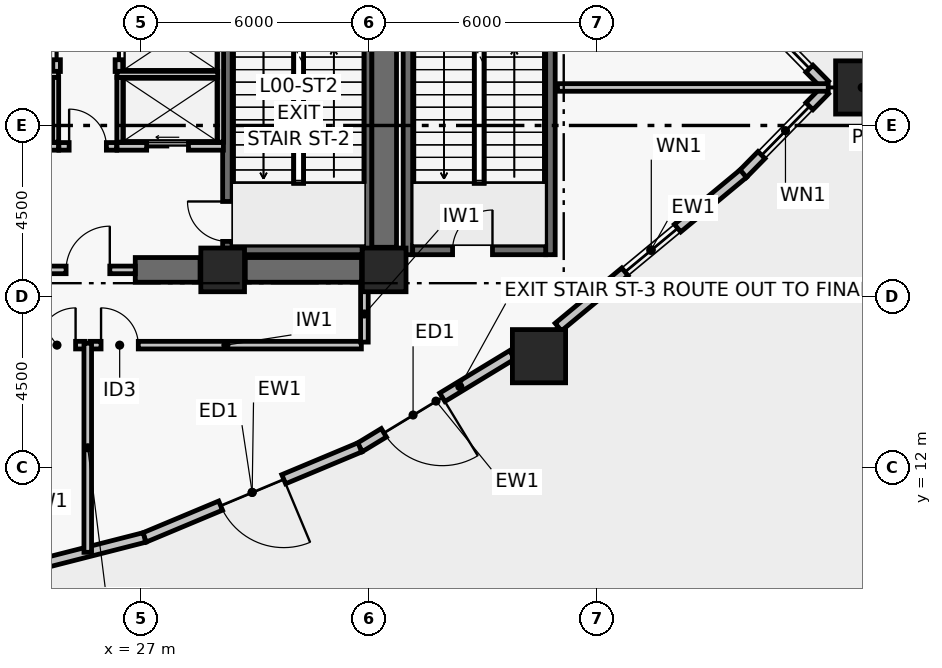
"""IFC4 building model, lengths in metres.
Left out: names, types, materials, properties, quantities, classifications, styles, units other than length and angle.
Written with IfcOpenShell. Run it as: python <this file> out.ifc"""

import sys

from ifc_helpers import new_model, si_unit, direction, frame, frame_2d, origin, origin_2d, place, context, subcontext, project, spatial, rectangle, hollow_rectangle, extrude, element, fill, save


model = new_model("IFC4")
c1 = context("Model", 3, precision=1e-05, world=origin(), true_north=direction((0.0, 1.0)))
c2 = subcontext(c1, "Body", "Model", "MODEL_VIEW")
j1 = project(units=[si_unit("LENGTHUNIT", "METRE"), si_unit("PLANEANGLEUNIT", "RADIAN")], contexts=[c1])
p1 = place(None, origin())
s1 = spatial("IfcSite", under=j1, at=p1, CompositionType="ELEMENT")
p2 = place(p1, origin())
s2 = spatial("IfcBuilding", under=s1, at=p2, CompositionType="ELEMENT")
p3 = place(p2, origin())
s3 = spatial("IfcBuildingStorey", under=s2, at=p3, CompositionType="ELEMENT", Elevation=0.0)
for number, where, z_axis, x_axis in (
    (1, (29.15, 17.2, 0.0), (0.0, 0.0, 1.0), (1.0, 0.0, 0.0)),
    (2, (33.4, 17.2, 0.0), (0.0, 0.0, 1.0), (1.0, 0.0, 0.0)),
):
    element("IfcColumn", number, at=place(p3, frame(where, z_axis=z_axis, x_axis=x_axis)), inside=s3, PredefinedType="COLUMN", context=c2, shape_type="SweptSolid", body=[
        extrude(rectangle(XDim=1.15, YDim=1.15, at=origin_2d()), origin(), (0.0, 0.0, 1.0), 7.2),
    ])
p4 = place(p3, frame((26.85, 17.2, 0.0), z_axis=(0.0, 0.0, 1.0), x_axis=(1.0, 0.0, 0.0)))
e3 = element("IfcWall", 3, at=p4, inside=s3, PredefinedType="SHEAR", context=c2, shape_type="SweptSolid", body=[
    extrude(rectangle(XDim=1.705, YDim=0.65, at=frame_2d((0.853, 0.0))), origin(), (0.0, 0.0, 1.0), 6.88),
])
p5 = place(p3, frame((29.745, 17.2, 0.0), z_axis=(0.0, 0.0, 1.0), x_axis=(1.0, 0.0, 0.0)))
e4 = element("IfcWall", 4, at=p5, inside=s3, PredefinedType="SHEAR", context=c2, shape_type="SweptSolid", body=[
    extrude(rectangle(XDim=3.06, YDim=0.65, at=frame_2d((1.53, 0.0))), origin(), (0.0, 0.0, 1.0), 6.88),
])
p6 = place(p3, frame((33.4, 17.795, 0.0), z_axis=(0.0, 0.0, 1.0), x_axis=(0.0, 1.0, 0.0)))
e5 = element("IfcWall", 5, at=p6, inside=s3, PredefinedType="SHEAR", context=c2, shape_type="SweptSolid", body=[
    extrude(rectangle(XDim=8.41, YDim=0.65, at=frame_2d((4.205, 0.0))), origin(), (0.0, 0.0, 1.0), 6.88),
])
p7 = place(p3, frame((29.275, 17.6, 0.0), z_axis=(0.0, 0.0, 1.0), x_axis=(0.0, 1.0, 0.0)))
e6 = element("IfcWall", 6, at=p7, inside=s3, PredefinedType="SHEAR", context=c2, shape_type="SweptSolid", body=[
    extrude(rectangle(XDim=8.8, YDim=0.25, at=frame_2d((4.4, 0.0))), origin(), (0.0, 0.0, 1.0), 6.88),
])
p8 = place(p7, frame((0.35, 0.0, 0.0)))
e7 = element("IfcOpeningElement", 7, at=p8, cuts=e6, PredefinedType="OPENING", context=c2, shape_type="SweptSolid", body=[
    extrude(rectangle(XDim=1.05, YDim=2.08, at=frame_2d((0.525, 1.04))), frame((0.0, 0.135, 0.0), z_axis=(0.0, -1.0, 0.0), x_axis=(1.0, 0.0, 0.0)), (0.0, 0.0, 1.0), 0.27),
])
p9 = place(p3, frame((32.946, 17.6, 0.0), z_axis=(0.0, 0.0, 1.0), x_axis=(0.0, 1.0, 0.0)))
e8 = element("IfcWall", 8, at=p9, inside=s3, PredefinedType="SHEAR", context=c2, shape_type="SweptSolid", body=[
    extrude(rectangle(XDim=8.8, YDim=0.25, at=frame_2d((4.4, 0.0))), origin(), (0.0, 0.0, 1.0), 6.88),
])
p10 = place(p3, frame((29.4, 17.725, 0.0), z_axis=(0.0, 0.0, 1.0), x_axis=(1.0, 0.0, 0.0)))
e9 = element("IfcWall", 9, at=p10, inside=s3, PredefinedType="SHEAR", context=c2, shape_type="SweptSolid", body=[
    extrude(rectangle(XDim=3.421, YDim=0.25, at=frame_2d((1.71, 0.0))), origin(), (0.0, 0.0, 1.0), 6.88),
])
for number, where, z_axis, x_axis in (
    (10, (34.025, 17.6, 0.0), (0.0, 0.0, 1.0), (0.0, 1.0, 0.0)),
    (11, (37.775, 17.6, 0.0), (0.0, 0.0, 1.0), (0.0, 1.0, 0.0)),
):
    element("IfcWall", number, at=place(p3, frame(where, z_axis=z_axis, x_axis=x_axis)), inside=s3, PredefinedType="SHEAR", context=c2, shape_type="SweptSolid", body=[
        extrude(rectangle(XDim=8.8, YDim=0.25, at=frame_2d((4.4, 0.0))), origin(), (0.0, 0.0, 1.0), 6.88),
    ])
p11 = place(p3, frame((34.15, 17.725, 0.0), z_axis=(0.0, 0.0, 1.0), x_axis=(1.0, 0.0, 0.0)))
e12 = element("IfcWall", 12, at=p11, inside=s3, PredefinedType="SHEAR", context=c2, shape_type="SweptSolid", body=[
    extrude(rectangle(XDim=3.5, YDim=0.25, at=frame_2d((1.75, 0.0))), origin(), (0.0, 0.0, 1.0), 6.88),
])
p12 = place(p11, frame((1.05, 0.0, 0.0)))
e13 = element("IfcOpeningElement", 13, at=p12, cuts=e12, PredefinedType="OPENING", context=c2, shape_type="SweptSolid", body=[
    extrude(rectangle(XDim=1.05, YDim=2.08, at=frame_2d((0.525, 1.04))), frame((0.0, 0.135, 0.0), z_axis=(0.0, -1.0, 0.0), x_axis=(1.0, 0.0, 0.0)), (0.0, 0.0, 1.0), 0.27),
])
for number, where, z_axis, x_axis in (
    (14, (45.979, 22.0, 0.0), (0.0, 0.0, 1.0), (1.0, 0.0, 0.0)),
    (15, (37.474, 14.929, 0.0), (0.0, 0.0, 1.0), (1.0, 0.0, 0.0)),
):
    element("IfcColumn", number, at=place(p3, frame(where, z_axis=z_axis, x_axis=x_axis)), inside=s3, PredefinedType="USERDEFINED", context=c2, shape_type="SweptSolid", body=[
        extrude(hollow_rectangle(XDim=1.4, YDim=1.4, WallThickness=0.055, at=origin_2d()), origin(), (0.0, 0.0, 1.0), 7.2),
    ])
p13 = place(p3, frame((36.767, 14.965, 0.0), z_axis=(0.0, 0.0, 1.0), x_axis=(-0.854658781081, -0.519190107688, 0.0)))
e16 = element("IfcWall", 16, at=p13, inside=s3, PredefinedType="PARTITIONING", context=c2, shape_type="SweptSolid", body=[
    extrude(rectangle(XDim=4.688, YDim=0.26, at=frame_2d((2.344, 0.0))), origin(), (0.0, 0.0, 1.0), 5.43),
])
p14 = place(p13, frame((2.15, 0.0, 0.0)))
e17 = element("IfcOpeningElement", 17, at=p14, cuts=e16, PredefinedType="OPENING", context=c2, shape_type="SweptSolid", body=[
    extrude(rectangle(XDim=1.8, YDim=2.3, at=frame_2d((0.9, 1.15))), frame((0.0, 0.14, 0.0), z_axis=(0.0, -1.0, 0.0), x_axis=(1.0, 0.0, 0.0)), (0.0, 0.0, 1.0), 0.28),
])
p15 = place(p3, frame((32.76, 12.531, 0.0), z_axis=(0.0, 0.0, 1.0), x_axis=(-0.922544641811, -0.385890378042, 0.0)))
e18 = element("IfcWall", 18, at=p15, inside=s3, PredefinedType="PARTITIONING", context=c2, shape_type="SweptSolid", body=[
    extrude(rectangle(XDim=6.144, YDim=0.26, at=frame_2d((3.072, 0.0))), origin(), (0.0, 0.0, 1.0), 5.43),
])
p16 = place(p15, frame((2.172, 0.0, 0.0)))
e19 = element("IfcOpeningElement", 19, at=p16, cuts=e18, PredefinedType="OPENING", context=c2, shape_type="SweptSolid", body=[
    extrude(rectangle(XDim=1.8, YDim=2.3, at=frame_2d((0.9, 1.15))), frame((0.0, 0.14, 0.0), z_axis=(0.0, -1.0, 0.0), x_axis=(1.0, 0.0, 0.0)), (0.0, 0.0, 1.0), 0.28),
])
p17 = place(p3, frame((27.092, 10.16, 0.0), z_axis=(0.0, 0.0, 1.0), x_axis=(-0.968977702302, -0.247148158887, 0.0)))
e20 = element("IfcWall", 20, at=p17, inside=s3, PredefinedType="PARTITIONING", context=c2, shape_type="SweptSolid", body=[
    extrude(rectangle(XDim=6.286, YDim=0.26, at=frame_2d((3.143, 0.0))), origin(), (0.0, 0.0, 1.0), 5.43),
])
p18 = place(p3, frame((42.841, 24.275, 0.0), z_axis=(0.0, 0.0, 1.0), x_axis=(0.700581279712, -0.713572610543, 0.0)))
e21 = element("IfcWall", 21, at=p18, inside=s3, PredefinedType="PARTITIONING", context=c2, shape_type="SweptSolid", body=[
    extrude(rectangle(XDim=3.082, YDim=0.26, at=frame_2d((1.541, 0.0))), origin(), (0.0, 0.0, 1.0), 5.43),
])
p19 = place(p18, frame((0.698, 0.0, 0.9)))
e22 = element("IfcOpeningElement", 22, at=p19, cuts=e21, PredefinedType="OPENING", context=c2, shape_type="SweptSolid", body=[
    extrude(rectangle(XDim=1.8, YDim=1.5, at=frame_2d((0.9, 0.75))), frame((0.0, 0.14, 0.0), z_axis=(0.0, -1.0, 0.0), x_axis=(1.0, 0.0, 0.0)), (0.0, 0.0, 1.0), 0.28),
])
p20 = place(p3, frame((45.0, 21.924, 0.0), z_axis=(0.0, 0.0, 1.0), x_axis=(-0.700581279712, -0.713572610543, 0.0)))
e23 = element("IfcWall", 23, at=p20, inside=s3, PredefinedType="PARTITIONING", context=c2, shape_type="SweptSolid", body=[
    extrude(rectangle(XDim=3.082, YDim=0.26, at=frame_2d((1.541, 0.0))), origin(), (0.0, 0.0, 1.0), 5.43),
])
p21 = place(p20, frame((0.585, 0.0, 0.9)))
e24 = element("IfcOpeningElement", 24, at=p21, cuts=e23, PredefinedType="OPENING", context=c2, shape_type="SweptSolid", body=[
    extrude(rectangle(XDim=1.8, YDim=1.5, at=frame_2d((0.9, 0.75))), frame((0.0, 0.14, 0.0), z_axis=(0.0, -1.0, 0.0), x_axis=(1.0, 0.0, 0.0)), (0.0, 0.0, 1.0), 0.28),
])
p22 = place(p3, frame((42.85, 19.733, 0.0), z_axis=(0.0, 0.0, 1.0), x_axis=(-0.769753796379, -0.638340890873, 0.0)))
e25 = element("IfcWall", 25, at=p22, inside=s3, PredefinedType="PARTITIONING", context=c2, shape_type="SweptSolid", body=[
    extrude(rectangle(XDim=6.324, YDim=0.26, at=frame_2d((3.162, 0.0))), origin(), (0.0, 0.0, 1.0), 5.43),
])
p23 = place(p22, frame((2.246, 0.0, 0.9)))
e26 = element("IfcOpeningElement", 26, at=p23, cuts=e25, PredefinedType="OPENING", context=c2, shape_type="SweptSolid", body=[
    extrude(rectangle(XDim=1.8, YDim=1.5, at=frame_2d((0.9, 0.75))), frame((0.0, 0.14, 0.0), z_axis=(0.0, -1.0, 0.0), x_axis=(1.0, 0.0, 0.0)), (0.0, 0.0, 1.0), 0.28),
])
p24 = place(p3, frame((24.35, 17.2, 0.0), z_axis=(0.0, 0.0, 1.0), x_axis=(1.0, 0.0, 0.0)))
e27 = element("IfcWall", 27, at=p24, inside=s3, PredefinedType="PARTITIONING", context=c2, shape_type="SweptSolid", body=[
    extrude(rectangle(XDim=2.5, YDim=0.2, at=frame_2d((1.25, 0.0))), origin(), (0.0, 0.0, 1.0), 6.01),
])
p25 = place(p24, frame((0.68, 0.0, 0.0)))
e28 = element("IfcOpeningElement", 28, at=p25, cuts=e27, PredefinedType="OPENING", context=c2, shape_type="SweptSolid", body=[
    extrude(rectangle(XDim=1.15, YDim=2.08, at=frame_2d((0.575, 1.04))), frame((0.0, 0.11, 0.0), z_axis=(0.0, -1.0, 0.0), x_axis=(1.0, 0.0, 0.0)), (0.0, 0.0, 1.0), 0.22),
])
p26 = place(p3, frame((24.84, 20.45, 0.0), z_axis=(0.0, 0.0, 1.0), x_axis=(1.0, 0.0, 0.0)))
e29 = element("IfcWall", 29, at=p26, inside=s3, PredefinedType="PARTITIONING", context=c2, shape_type="SweptSolid", body=[
    extrude(rectangle(XDim=1.52, YDim=0.2, at=frame_2d((0.76, 0.0))), origin(), (0.0, 0.0, 1.0), 6.88),
])
p27 = place(p26, frame((0.27, 0.0, 0.0)))
e30 = element("IfcOpeningElement", 30, at=p27, cuts=e29, PredefinedType="OPENING", context=c2, shape_type="SweptSolid", body=[
    extrude(rectangle(XDim=0.98, YDim=2.06, at=frame_2d((0.49, 1.03))), frame((0.0, 0.11, 0.0), z_axis=(0.0, -1.0, 0.0), x_axis=(1.0, 0.0, 0.0)), (0.0, 0.0, 1.0), 0.22),
])
p28 = place(p3, frame((22.03, 20.45, 0.0), z_axis=(0.0, 0.0, 1.0), x_axis=(1.0, 0.0, 0.0)))
e31 = element("IfcWall", 31, at=p28, inside=s3, PredefinedType="PARTITIONING", context=c2, shape_type="SweptSolid", body=[
    extrude(rectangle(XDim=2.8, YDim=0.2, at=frame_2d((1.4, 0.0))), origin(), (0.0, 0.0, 1.0), 6.88),
])
p29 = place(p28, frame((0.78, 0.0, 0.0)))
e32 = element("IfcOpeningElement", 32, at=p29, cuts=e31, PredefinedType="OPENING", context=c2, shape_type="SweptSolid", body=[
    extrude(rectangle(XDim=1.1, YDim=2.08, at=frame_2d((0.55, 1.04))), frame((0.0, 0.11, 0.0), z_axis=(0.0, -1.0, 0.0), x_axis=(1.0, 0.0, 0.0)), (0.0, 0.0, 1.0), 0.22),
])
p30 = place(p3, frame((26.37, 20.45, 0.0), z_axis=(0.0, 0.0, 1.0), x_axis=(1.0, 0.0, 0.0)))
e33 = element("IfcWall", 33, at=p30, inside=s3, PredefinedType="PARTITIONING", context=c2, shape_type="SweptSolid", body=[
    extrude(rectangle(XDim=2.8, YDim=0.2, at=frame_2d((1.4, 0.0))), origin(), (0.0, 0.0, 1.0), 6.88),
])
p31 = place(p30, frame((0.78, 0.0, 0.0)))
e34 = element("IfcOpeningElement", 34, at=p31, cuts=e33, PredefinedType="OPENING", context=c2, shape_type="SweptSolid", body=[
    extrude(rectangle(XDim=1.1, YDim=2.08, at=frame_2d((0.55, 1.04))), frame((0.0, 0.11, 0.0), z_axis=(0.0, -1.0, 0.0), x_axis=(1.0, 0.0, 0.0)), (0.0, 0.0, 1.0), 0.22),
])
p32 = place(p3, frame((24.78, 22.42, 0.0), z_axis=(0.0, 0.0, 1.0), x_axis=(0.0, 1.0, 0.0)))
e35 = element("IfcWall", 35, at=p32, inside=s3, PredefinedType="PARTITIONING", context=c2, shape_type="SweptSolid", body=[
    extrude(rectangle(XDim=1.72, YDim=0.2, at=frame_2d((0.86, 0.0))), origin(), (0.0, 0.0, 1.0), 6.88),
])
p33 = place(p32, frame((0.31, 0.0, 0.0)))
e36 = element("IfcOpeningElement", 36, at=p33, cuts=e35, PredefinedType="OPENING", context=c2, shape_type="SweptSolid", body=[
    extrude(rectangle(XDim=1.1, YDim=2.08, at=frame_2d((0.55, 1.04))), frame((0.0, 0.11, 0.0), z_axis=(0.0, -1.0, 0.0), x_axis=(1.0, 0.0, 0.0)), (0.0, 0.0, 1.0), 0.22),
])
p34 = place(p3, frame((26.42, 22.42, 0.0), z_axis=(0.0, 0.0, 1.0), x_axis=(0.0, 1.0, 0.0)))
e37 = element("IfcWall", 37, at=p34, inside=s3, PredefinedType="PARTITIONING", context=c2, shape_type="SweptSolid", body=[
    extrude(rectangle(XDim=1.72, YDim=0.2, at=frame_2d((0.86, 0.0))), origin(), (0.0, 0.0, 1.0), 6.88),
])
p35 = place(p34, frame((0.31, 0.0, 0.0)))
e38 = element("IfcOpeningElement", 38, at=p35, cuts=e37, PredefinedType="OPENING", context=c2, shape_type="SweptSolid", body=[
    extrude(rectangle(XDim=1.1, YDim=2.08, at=frame_2d((0.55, 1.04))), frame((0.0, 0.11, 0.0), z_axis=(0.0, -1.0, 0.0), x_axis=(1.0, 0.0, 0.0)), (0.0, 0.0, 1.0), 0.22),
])
p36 = place(p3, frame((24.755, 20.56, 0.0), z_axis=(0.0, 0.0, 1.0), x_axis=(0.0, 1.0, 0.0)))
e39 = element("IfcWall", 39, at=p36, inside=s3, PredefinedType="PARTITIONING", context=c2, shape_type="SweptSolid", body=[
    extrude(rectangle(XDim=1.71, YDim=0.16, at=frame_2d((0.855, 0.0))), origin(), (0.0, 0.0, 1.0), 6.88),
])
p37 = place(p3, frame((22.18, 22.345, 0.0), z_axis=(0.0, 0.0, 1.0), x_axis=(1.0, 0.0, 0.0)))
e40 = element("IfcWall", 40, at=p37, inside=s3, PredefinedType="PARTITIONING", context=c2, shape_type="SweptSolid", body=[
    extrude(rectangle(XDim=2.65, YDim=0.16, at=frame_2d((1.325, 0.0))), origin(), (0.0, 0.0, 1.0), 6.88),
])
p38 = place(p3, frame((29.095, 20.56, 0.0), z_axis=(0.0, 0.0, 1.0), x_axis=(0.0, 1.0, 0.0)))
e41 = element("IfcWall", 41, at=p38, inside=s3, PredefinedType="PARTITIONING", context=c2, shape_type="SweptSolid", body=[
    extrude(rectangle(XDim=5.45, YDim=0.16, at=frame_2d((2.725, 0.0))), origin(), (0.0, 0.0, 1.0), 6.88),
])
p39 = place(p3, frame((26.445, 20.56, 0.0), z_axis=(0.0, 0.0, 1.0), x_axis=(0.0, 1.0, 0.0)))
e42 = element("IfcWall", 42, at=p39, inside=s3, PredefinedType="PARTITIONING", context=c2, shape_type="SweptSolid", body=[
    extrude(rectangle(XDim=1.71, YDim=0.16, at=frame_2d((0.855, 0.0))), origin(), (0.0, 0.0, 1.0), 6.88),
])
p40 = place(p3, frame((26.37, 22.345, 0.0), z_axis=(0.0, 0.0, 1.0), x_axis=(1.0, 0.0, 0.0)))
e43 = element("IfcWall", 43, at=p40, inside=s3, PredefinedType="PARTITIONING", context=c2, shape_type="SweptSolid", body=[
    extrude(rectangle(XDim=2.65, YDim=0.16, at=frame_2d((1.325, 0.0))), origin(), (0.0, 0.0, 1.0), 6.88),
])
p41 = place(p3, frame((17.552, 15.22, 0.0), z_axis=(0.0, 0.0, 1.0), x_axis=(1.0, 0.0, 0.0)))
e44 = element("IfcWall", 44, at=p41, inside=s3, PredefinedType="PARTITIONING", context=c2, shape_type="SweptSolid", body=[
    extrude(rectangle(XDim=7.978, YDim=0.2, at=frame_2d((3.989, 0.0))), origin(), (0.0, 0.0, 1.0), 5.46),
])
p42 = place(p41, frame((6.748, 0.0, 0.0)))
e45 = element("IfcOpeningElement", 45, at=p42, cuts=e44, PredefinedType="OPENING", context=c2, shape_type="SweptSolid", body=[
    extrude(rectangle(XDim=0.98, YDim=2.06, at=frame_2d((0.49, 1.03))), frame((0.0, 0.11, 0.0), z_axis=(0.0, -1.0, 0.0), x_axis=(1.0, 0.0, 0.0)), (0.0, 0.0, 1.0), 0.22),
])
p43 = place(p3, frame((25.67, 15.22, 0.0), z_axis=(0.0, 0.0, 1.0), x_axis=(1.0, 0.0, 0.0)))
e46 = element("IfcWall", 46, at=p43, inside=s3, PredefinedType="PARTITIONING", context=c2, shape_type="SweptSolid", body=[
    extrude(rectangle(XDim=7.13, YDim=0.2, at=frame_2d((3.565, 0.0))), origin(), (0.0, 0.0, 1.0), 6.88),
])
p44 = place(p43, frame((0.28, 0.0, 0.0)))
e47 = element("IfcOpeningElement", 47, at=p44, cuts=e46, PredefinedType="OPENING", context=c2, shape_type="SweptSolid", body=[
    extrude(rectangle(XDim=0.98, YDim=2.06, at=frame_2d((0.49, 1.03))), frame((0.0, 0.11, 0.0), z_axis=(0.0, -1.0, 0.0), x_axis=(1.0, 0.0, 0.0)), (0.0, 0.0, 1.0), 0.22),
])
p45 = place(p3, frame((32.88, 15.3, 0.0), z_axis=(0.0, 0.0, 1.0), x_axis=(0.0, 1.0, 0.0)))
e48 = element("IfcWall", 48, at=p45, inside=s3, PredefinedType="PARTITIONING", context=c2, shape_type="SweptSolid", body=[
    extrude(rectangle(XDim=1.48, YDim=0.2, at=frame_2d((0.74, 0.0))), origin(), (0.0, 0.0, 1.0), 6.01),
])
p46 = place(p3, frame((32.88, 16.78, 0.0), z_axis=(0.0, 0.0, 1.0), x_axis=(1.0, 0.0, 0.0)))
e49 = element("IfcWall", 49, at=p46, inside=s3, PredefinedType="PARTITIONING", context=c2, shape_type="SweptSolid", body=[
    extrude(rectangle(XDim=0.86, YDim=0.2, at=frame_2d((0.43, 0.0))), origin(), (0.0, 0.0, 1.0), 5.46),
])
p47 = place(p3, frame((25.6, 9.769, 0.0), z_axis=(0.0, 0.0, 1.0), x_axis=(0.0, 1.0, 0.0)))
e50 = element("IfcWall", 50, at=p47, inside=s3, PredefinedType="PARTITIONING", context=c2, shape_type="SweptSolid", body=[
    extrude(rectangle(XDim=5.501, YDim=0.2, at=frame_2d((2.75, 0.0))), origin(), (0.0, 0.0, 1.0), 6.88),
])
p48 = place(p3, frame((37.96, 22.0, 0.0), z_axis=(0.0, 0.0, 1.0), x_axis=(1.0, 0.0, 0.0)))
e51 = element("IfcWall", 51, at=p48, inside=s3, PredefinedType="PARTITIONING", context=c2, shape_type="SweptSolid", body=[
    extrude(rectangle(XDim=7.125, YDim=0.2, at=frame_2d((3.562, 0.0))), origin(), (0.0, 0.0, 1.0), 6.88),
])
p49 = place(p14, origin())
e52 = element("IfcDoor", 52, at=p49, inside=s3, OperationType="DOUBLE_DOOR_SINGLE_SWING", PredefinedType="DOOR", context=c2, shape_type="SweptSolid", body=[
    extrude(rectangle(XDim=1.8, YDim=2.3, at=frame_2d((0.9, 1.15))), frame((0.0, 0.025, 0.0), z_axis=(0.0, -1.0, 0.0), x_axis=(1.0, 0.0, 0.0)), (0.0, 0.0, 1.0), 0.05),
])
fill(e17, e52)
p50 = place(p16, origin())
e53 = element("IfcDoor", 53, at=p50, inside=s3, OperationType="DOUBLE_DOOR_SINGLE_SWING", PredefinedType="DOOR", context=c2, shape_type="SweptSolid", body=[
    extrude(rectangle(XDim=1.8, YDim=2.3, at=frame_2d((0.9, 1.15))), frame((0.0, 0.025, 0.0), z_axis=(0.0, -1.0, 0.0), x_axis=(1.0, 0.0, 0.0)), (0.0, 0.0, 1.0), 0.05),
])
fill(e19, e53)
p51 = place(p19, origin())
e54 = element("IfcWindow", 54, at=p51, inside=s3, PartitioningType="SINGLE_PANEL", PredefinedType="WINDOW", context=c2, shape_type="SweptSolid", body=[
    extrude(rectangle(XDim=1.8, YDim=1.5, at=frame_2d((0.9, 0.75))), frame((0.0, 0.03, 0.0), z_axis=(0.0, -1.0, 0.0), x_axis=(1.0, 0.0, 0.0)), (0.0, 0.0, 1.0), 0.06),
])
fill(e22, e54)
p52 = place(p21, origin())
e55 = element("IfcWindow", 55, at=p52, inside=s3, PartitioningType="SINGLE_PANEL", PredefinedType="WINDOW", context=c2, shape_type="SweptSolid", body=[
    extrude(rectangle(XDim=1.8, YDim=1.5, at=frame_2d((0.9, 0.75))), frame((0.0, 0.03, 0.0), z_axis=(0.0, -1.0, 0.0), x_axis=(1.0, 0.0, 0.0)), (0.0, 0.0, 1.0), 0.06),
])
fill(e24, e55)
p53 = place(p23, origin())
e56 = element("IfcWindow", 56, at=p53, inside=s3, PartitioningType="SINGLE_PANEL", PredefinedType="WINDOW", context=c2, shape_type="SweptSolid", body=[
    extrude(rectangle(XDim=1.8, YDim=1.5, at=frame_2d((0.9, 0.75))), frame((0.0, 0.03, 0.0), z_axis=(0.0, -1.0, 0.0), x_axis=(1.0, 0.0, 0.0)), (0.0, 0.0, 1.0), 0.06),
])
fill(e26, e56)
p54 = place(p8, origin())
e57 = element("IfcDoor", 57, at=p54, inside=s3, OperationType="SINGLE_SWING_RIGHT", PredefinedType="DOOR", context=c2, shape_type="SweptSolid", body=[
    extrude(rectangle(XDim=1.05, YDim=2.08, at=frame_2d((0.525, 1.04))), frame((0.0, 0.025, 0.0), z_axis=(0.0, -1.0, 0.0), x_axis=(1.0, 0.0, 0.0)), (0.0, 0.0, 1.0), 0.05),
])
fill(e7, e57)
p55 = place(p12, origin())
e58 = element("IfcDoor", 58, at=p55, inside=s3, OperationType="SINGLE_SWING_RIGHT", PredefinedType="DOOR", context=c2, shape_type="SweptSolid", body=[
    extrude(rectangle(XDim=1.05, YDim=2.08, at=frame_2d((0.525, 1.04))), frame((0.0, 0.025, 0.0), z_axis=(0.0, -1.0, 0.0), x_axis=(1.0, 0.0, 0.0)), (0.0, 0.0, 1.0), 0.05),
])
fill(e13, e58)
p56 = place(p25, origin())
e59 = element("IfcDoor", 59, at=p56, inside=s3, OperationType="SINGLE_SWING_RIGHT", PredefinedType="DOOR", context=c2, shape_type="SweptSolid", body=[
    extrude(rectangle(XDim=1.15, YDim=2.08, at=frame_2d((0.575, 1.04))), frame((0.0, 0.025, 0.0), z_axis=(0.0, -1.0, 0.0), x_axis=(1.0, 0.0, 0.0)), (0.0, 0.0, 1.0), 0.05),
])
fill(e28, e59)
p57 = place(p27, origin())
e60 = element("IfcDoor", 60, at=p57, inside=s3, OperationType="SINGLE_SWING_LEFT", PredefinedType="DOOR", context=c2, shape_type="SweptSolid", body=[
    extrude(rectangle(XDim=0.98, YDim=2.06, at=frame_2d((0.49, 1.03))), frame((0.0, 0.025, 0.0), z_axis=(0.0, -1.0, 0.0), x_axis=(1.0, 0.0, 0.0)), (0.0, 0.0, 1.0), 0.05),
])
fill(e30, e60)
p58 = place(p31, origin())
e61 = element("IfcDoor", 61, at=p58, inside=s3, OperationType="DOUBLE_DOOR_SLIDING", PredefinedType="DOOR", context=c2, shape_type="SweptSolid", body=[
    extrude(rectangle(XDim=1.1, YDim=2.08, at=frame_2d((0.55, 1.04))), frame((0.0, 0.025, 0.0), z_axis=(0.0, -1.0, 0.0), x_axis=(1.0, 0.0, 0.0)), (0.0, 0.0, 1.0), 0.05),
])
fill(e34, e61)
p59 = place(p33, origin())
e62 = element("IfcDoor", 62, at=p59, inside=s3, OperationType="DOUBLE_DOOR_SLIDING", PredefinedType="DOOR", context=c2, shape_type="SweptSolid", body=[
    extrude(rectangle(XDim=1.1, YDim=2.08, at=frame_2d((0.55, 1.04))), frame((0.0, 0.025, 0.0), z_axis=(0.0, -1.0, 0.0), x_axis=(1.0, 0.0, 0.0)), (0.0, 0.0, 1.0), 0.05),
])
fill(e36, e62)
p60 = place(p35, origin())
e63 = element("IfcDoor", 63, at=p60, inside=s3, OperationType="DOUBLE_DOOR_SLIDING", PredefinedType="DOOR", context=c2, shape_type="SweptSolid", body=[
    extrude(rectangle(XDim=1.1, YDim=2.08, at=frame_2d((0.55, 1.04))), frame((0.0, 0.025, 0.0), z_axis=(0.0, -1.0, 0.0), x_axis=(1.0, 0.0, 0.0)), (0.0, 0.0, 1.0), 0.05),
])
fill(e38, e63)
p61 = place(p42, origin())
e64 = element("IfcDoor", 64, at=p61, inside=s3, OperationType="SINGLE_SWING_RIGHT", PredefinedType="DOOR", context=c2, shape_type="SweptSolid", body=[
    extrude(rectangle(XDim=0.98, YDim=2.06, at=frame_2d((0.49, 1.03))), frame((0.0, 0.025, 0.0), z_axis=(0.0, -1.0, 0.0), x_axis=(1.0, 0.0, 0.0)), (0.0, 0.0, 1.0), 0.05),
])
fill(e45, e64)
p62 = place(p44, origin())
e65 = element("IfcDoor", 65, at=p62, inside=s3, OperationType="SINGLE_SWING_LEFT", PredefinedType="DOOR", context=c2, shape_type="SweptSolid", body=[
    extrude(rectangle(XDim=0.98, YDim=2.06, at=frame_2d((0.49, 1.03))), frame((0.0, 0.025, 0.0), z_axis=(0.0, -1.0, 0.0), x_axis=(1.0, 0.0, 0.0)), (0.0, 0.0, 1.0), 0.05),
])
fill(e47, e65)
save(model, sys.argv[1])
